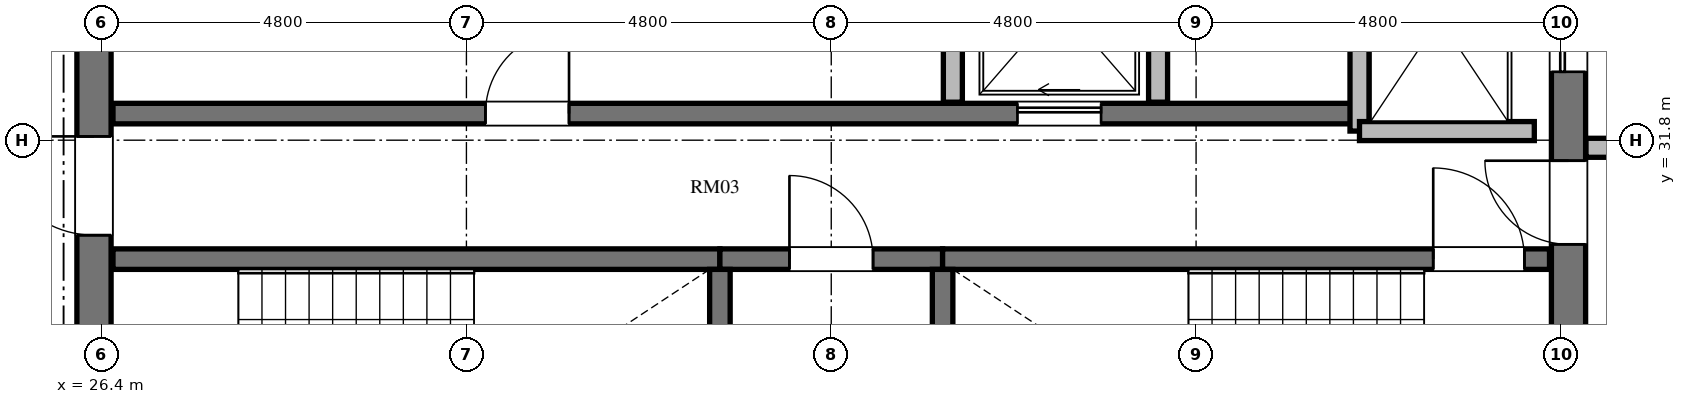
"""IFC4 building model, lengths in metres.
Left out: names, types, materials, properties, quantities, classifications, styles, units other than length and angle.
Written with IfcOpenShell. Run it as: python <this file> out.ifc"""

import sys

from ifc_helpers import new_model, si_unit, direction, frame, frame_2d, origin, place, context, subcontext, project, spatial, rectangle, extrude, element, fill, save


model = new_model("IFC4")
c1 = context("Model", 3, precision=1e-05, world=origin(), true_north=direction((0.0, 1.0)))
c2 = subcontext(c1, "Body", "Model", "MODEL_VIEW")
j1 = project(units=[si_unit("LENGTHUNIT", "METRE"), si_unit("PLANEANGLEUNIT", "RADIAN")], contexts=[c1])
p1 = place(None, origin())
s1 = spatial("IfcSite", under=j1, at=p1, CompositionType="ELEMENT")
p2 = place(p1, origin())
s2 = spatial("IfcBuilding", under=s1, at=p2, CompositionType="ELEMENT")
p3 = place(p2, frame((0.0, 0.0, 312.612)))
s3 = spatial("IfcBuildingStorey", under=s2, at=p3, CompositionType="ELEMENT", Elevation=312.612)
p4 = place(p3, frame((26.3, 20.95, 0.0), z_axis=(0.0, 0.0, 1.0), x_axis=(0.0, 1.0, 0.0)))
e1 = element("IfcWall", 1, at=p4, inside=s3, PredefinedType="SHEAR", context=c2, shape_type="SweptSolid", body=[
    extrude(rectangle(XDim=14.1, YDim=0.45, at=frame_2d((7.05, 0.0))), origin(), (0.0, 0.0, 1.0), 3.388),
])
p5 = place(p4, frame((6.5, 0.0, 0.0)))
e2 = element("IfcOpeningElement", 2, at=p5, cuts=e1, PredefinedType="OPENING", context=c2, shape_type="SweptSolid", body=[
    extrude(rectangle(XDim=1.2, YDim=2.15, at=frame_2d((0.6, 1.075))), frame((0.0, 0.235, 0.0), z_axis=(0.0, -1.0, 0.0), x_axis=(1.0, 0.0, 0.0)), (0.0, 0.0, 1.0), 0.47),
])
p6 = place(p4, frame((9.6, 0.0, 0.0)))
e3 = element("IfcOpeningElement", 3, at=p6, cuts=e1, PredefinedType="OPENING", context=c2, shape_type="SweptSolid", body=[
    extrude(rectangle(XDim=1.3, YDim=2.2, at=frame_2d((0.65, 1.1))), frame((0.0, 0.235, 0.0), z_axis=(0.0, -1.0, 0.0), x_axis=(1.0, 0.0, 0.0)), (0.0, 0.0, 1.0), 0.47),
])
p7 = place(p4, frame((3.26, 0.0, 0.0)))
e4 = element("IfcOpeningElement", 4, at=p7, cuts=e1, PredefinedType="OPENING", context=c2, shape_type="SweptSolid", body=[
    extrude(rectangle(XDim=1.3, YDim=2.2, at=frame_2d((0.65, 1.1))), frame((0.0, 0.235, 0.0), z_axis=(0.0, -1.0, 0.0), x_axis=(1.0, 0.0, 0.0)), (0.0, 0.0, 1.0), 0.47),
])
p8 = place(p3, frame((45.7, 20.95, 0.0), z_axis=(0.0, 0.0, 1.0), x_axis=(0.0, 1.0, 0.0)))
e5 = element("IfcWall", 5, at=p8, inside=s3, PredefinedType="SHEAR", context=c2, shape_type="SweptSolid", body=[
    extrude(rectangle(XDim=14.1, YDim=0.45, at=frame_2d((7.05, 0.0))), origin(), (0.0, 0.0, 1.0), 3.388),
])
p9 = place(p8, frame((11.75, 0.0, 0.0)))
e6 = element("IfcOpeningElement", 6, at=p9, cuts=e5, PredefinedType="OPENING", context=c2, shape_type="SweptSolid", body=[
    extrude(rectangle(XDim=1.4, YDim=2.3, at=frame_2d((0.7, 1.15))), frame((0.0, 0.235, 0.0), z_axis=(0.0, -1.0, 0.0), x_axis=(1.0, 0.0, 0.0)), (0.0, 0.0, 1.0), 0.47),
])
p10 = place(p8, frame((0.95, 0.0, 0.0)))
e7 = element("IfcOpeningElement", 7, at=p10, cuts=e5, PredefinedType="OPENING", context=c2, shape_type="SweptSolid", body=[
    extrude(rectangle(XDim=1.4, YDim=2.3, at=frame_2d((0.7, 1.15))), frame((0.0, 0.235, 0.0), z_axis=(0.0, -1.0, 0.0), x_axis=(1.0, 0.0, 0.0)), (0.0, 0.0, 1.0), 0.47),
])
p11 = place(p8, frame((9.48, 0.0, 0.0)))
e8 = element("IfcOpeningElement", 8, at=p11, cuts=e5, PredefinedType="OPENING", context=c2, shape_type="SweptSolid", body=[
    extrude(rectangle(XDim=1.1, YDim=2.15, at=frame_2d((0.55, 1.075))), frame((0.0, 0.235, 0.0), z_axis=(0.0, -1.0, 0.0), x_axis=(1.0, 0.0, 0.0)), (0.0, 0.0, 1.0), 0.47),
])
p12 = place(p3, frame((26.55, 30.235, 0.0), z_axis=(0.0, 0.0, 1.0), x_axis=(1.0, 0.0, 0.0)))
e9 = element("IfcWall", 9, at=p12, inside=s3, PredefinedType="SHEAR", context=c2, shape_type="SweptSolid", body=[
    extrude(rectangle(XDim=7.985, YDim=0.27, at=frame_2d((3.992, 0.0))), origin(), (0.0, 0.0, 1.0), 3.388),
])
p13 = place(p3, frame((34.535, 30.235, 0.0), z_axis=(0.0, 0.0, 1.0), x_axis=(1.0, 0.0, 0.0)))
e10 = element("IfcWall", 10, at=p13, inside=s3, PredefinedType="SHEAR", context=c2, shape_type="SweptSolid", body=[
    extrude(rectangle(XDim=2.93, YDim=0.27, at=frame_2d((1.465, 0.0))), origin(), (0.0, 0.0, 1.0), 3.388),
])
p14 = place(p13, frame((0.915, 0.0, 0.0)))
e11 = element("IfcOpeningElement", 11, at=p14, cuts=e10, PredefinedType="OPENING", context=c2, shape_type="SweptSolid", body=[
    extrude(rectangle(XDim=1.1, YDim=2.15, at=frame_2d((0.55, 1.075))), frame((0.0, 0.145, 0.0), z_axis=(0.0, -1.0, 0.0), x_axis=(1.0, 0.0, 0.0)), (0.0, 0.0, 1.0), 0.29),
])
p15 = place(p3, frame((37.465, 30.235, 0.0), z_axis=(0.0, 0.0, 1.0), x_axis=(1.0, 0.0, 0.0)))
e12 = element("IfcWall", 12, at=p15, inside=s3, PredefinedType="SHEAR", context=c2, shape_type="SweptSolid", body=[
    extrude(rectangle(XDim=7.985, YDim=0.27, at=frame_2d((3.992, 0.0))), origin(), (0.0, 0.0, 1.0), 3.388),
])
p16 = place(p15, frame((6.455, 0.0, 0.0)))
e13 = element("IfcOpeningElement", 13, at=p16, cuts=e12, PredefinedType="OPENING", context=c2, shape_type="SweptSolid", body=[
    extrude(rectangle(XDim=1.2, YDim=2.15, at=frame_2d((0.6, 1.075))), frame((0.0, 0.145, 0.0), z_axis=(0.0, -1.0, 0.0), x_axis=(1.0, 0.0, 0.0)), (0.0, 0.0, 1.0), 0.29),
])
for number, where, z_axis, x_axis in (
    (14, (34.535, 26.02, 0.0), (0.0, 0.0, 1.0), (0.0, 1.0, 0.0)),
    (15, (37.465, 26.02, 0.0), (0.0, 0.0, 1.0), (0.0, 1.0, 0.0)),
):
    element("IfcWall", number, at=place(p3, frame(where, z_axis=z_axis, x_axis=x_axis)), inside=s3, PredefinedType="SHEAR", context=c2, shape_type="SweptSolid", body=[
        extrude(rectangle(XDim=4.08, YDim=0.27, at=frame_2d((2.04, 0.0))), origin(), (0.0, 0.0, 1.0), 3.388),
    ])
p17 = place(p3, frame((26.55, 32.15, 0.0), z_axis=(0.0, 0.0, 1.0), x_axis=(1.0, 0.0, 0.0)))
e16 = element("IfcWall", 16, at=p17, inside=s3, PredefinedType="SHEAR", context=c2, shape_type="SweptSolid", body=[
    extrude(rectangle(XDim=16.4, YDim=0.27, at=frame_2d((8.2, 0.0))), origin(), (0.0, 0.0, 1.0), 3.388),
])
p18 = place(p17, frame((4.9, 0.0, 0.0)))
e17 = element("IfcOpeningElement", 17, at=p18, cuts=e16, PredefinedType="OPENING", context=c2, shape_type="SweptSolid", body=[
    extrude(rectangle(XDim=1.1, YDim=2.15, at=frame_2d((0.55, 1.075))), frame((0.0, 0.145, 0.0), z_axis=(0.0, -1.0, 0.0), x_axis=(1.0, 0.0, 0.0)), (0.0, 0.0, 1.0), 0.29),
])
p19 = place(p17, frame((11.9, 0.0, 0.0)))
e18 = element("IfcOpeningElement", 18, at=p19, cuts=e16, PredefinedType="OPENING", context=c2, shape_type="SweptSolid", body=[
    extrude(rectangle(XDim=1.1, YDim=2.2, at=frame_2d((0.55, 1.1))), frame((0.0, 0.145, 0.0), z_axis=(0.0, -1.0, 0.0), x_axis=(1.0, 0.0, 0.0)), (0.0, 0.0, 1.0), 0.29),
])
p20 = place(p3, frame((42.95, 31.92, 0.0), z_axis=(0.0, 0.0, 1.0), x_axis=(0.0, 1.0, 0.0)))
e19 = element("IfcWall", 19, at=p20, inside=s3, PredefinedType="SOLIDWALL", context=c2, shape_type="SweptSolid", body=[
    extrude(rectangle(XDim=3.18, YDim=0.25, at=frame_2d((1.59, 0.0))), origin(), (0.0, 0.0, 1.0), 3.008),
])
p21 = place(p3, frame((42.95, 31.92, 0.0), z_axis=(0.0, 0.0, 1.0), x_axis=(1.0, 0.0, 0.0)))
e20 = element("IfcWall", 20, at=p21, inside=s3, PredefinedType="SOLIDWALL", context=c2, shape_type="SweptSolid", body=[
    extrude(rectangle(XDim=2.3, YDim=0.25, at=frame_2d((1.15, 0.0))), origin(), (0.0, 0.0, 1.0), 3.008),
])
for number, where, z_axis, x_axis in (
    (21, (37.6, 32.3, 0.0), (0.0, 0.0, 1.0), (0.0, 1.0, 0.0)),
    (22, (40.3, 32.3, 0.0), (0.0, 0.0, 1.0), (0.0, 1.0, 0.0)),
):
    element("IfcWall", number, at=place(p3, frame(where, z_axis=z_axis, x_axis=x_axis)), inside=s3, PredefinedType="SOLIDWALL", context=c2, shape_type="SweptSolid", body=[
        extrude(rectangle(XDim=2.8, YDim=0.25, at=frame_2d((1.4, 0.0))), origin(), (0.0, 0.0, 1.0), 3.008),
    ])
p22 = place(p3, frame((45.93, 31.7, 0.0), z_axis=(0.0, 0.0, 1.0), x_axis=(1.0, 0.0, 0.0)))
e23 = element("IfcWall", 23, at=p22, inside=s3, PredefinedType="SOLIDWALL", context=c2, shape_type="SweptSolid", body=[
    extrude(rectangle(XDim=2.52, YDim=0.25, at=frame_2d((1.26, 0.0))), origin(), (0.0, 0.0, 1.0), 3.008),
])
p23 = place(p16, origin())
e24 = element("IfcDoor", 24, at=p23, inside=s3, OperationType="SINGLE_SWING_LEFT", PredefinedType="DOOR", context=c2, shape_type="SweptSolid", body=[
    extrude(rectangle(XDim=1.2, YDim=2.15, at=frame_2d((0.6, 1.075))), frame((0.0, 0.025, 0.0), z_axis=(0.0, -1.0, 0.0), x_axis=(1.0, 0.0, 0.0)), (0.0, 0.0, 1.0), 0.05),
])
fill(e13, e24)
p24 = place(p14, origin())
e25 = element("IfcDoor", 25, at=p24, inside=s3, OperationType="SINGLE_SWING_LEFT", PredefinedType="DOOR", context=c2, shape_type="SweptSolid", body=[
    extrude(rectangle(XDim=1.1, YDim=2.15, at=frame_2d((0.55, 1.075))), frame((0.0, 0.025, 0.0), z_axis=(0.0, -1.0, 0.0), x_axis=(1.0, 0.0, 0.0)), (0.0, 0.0, 1.0), 0.05),
])
fill(e11, e25)
p25 = place(p6, origin())
e26 = element("IfcDoor", 26, at=p25, inside=s3, OperationType="SINGLE_SWING_RIGHT", PredefinedType="DOOR", context=c2, shape_type="SweptSolid", body=[
    extrude(rectangle(XDim=1.3, YDim=2.2, at=frame_2d((0.65, 1.1))), frame((0.0, 0.025, 0.0), z_axis=(0.0, -1.0, 0.0), x_axis=(1.0, 0.0, 0.0)), (0.0, 0.0, 1.0), 0.05),
])
fill(e3, e26)
p26 = place(p18, origin())
e27 = element("IfcDoor", 27, at=p26, inside=s3, OperationType="SINGLE_SWING_RIGHT", PredefinedType="DOOR", context=c2, shape_type="SweptSolid", body=[
    extrude(rectangle(XDim=1.1, YDim=2.15, at=frame_2d((0.55, 1.075))), frame((0.0, 0.025, 0.0), z_axis=(0.0, -1.0, 0.0), x_axis=(1.0, 0.0, 0.0)), (0.0, 0.0, 1.0), 0.05),
])
fill(e17, e27)
p27 = place(p19, origin())
e28 = element("IfcDoor", 28, at=p27, inside=s3, OperationType="SLIDING_TO_LEFT", PredefinedType="DOOR", context=c2, shape_type="SweptSolid", body=[
    extrude(rectangle(XDim=1.1, YDim=2.2, at=frame_2d((0.55, 1.1))), frame((0.0, 0.025, 0.0), z_axis=(0.0, -1.0, 0.0), x_axis=(1.0, 0.0, 0.0)), (0.0, 0.0, 1.0), 0.05),
])
fill(e18, e28)
p28 = place(p9, origin())
e29 = element("IfcDoor", 29, at=p28, inside=s3, OperationType="SLIDING_TO_LEFT", PredefinedType="DOOR", context=c2, shape_type="SweptSolid", body=[
    extrude(rectangle(XDim=1.4, YDim=2.3, at=frame_2d((0.7, 1.15))), frame((0.0, 0.025, 0.0), z_axis=(0.0, -1.0, 0.0), x_axis=(1.0, 0.0, 0.0)), (0.0, 0.0, 1.0), 0.05),
])
fill(e6, e29)
p29 = place(p11, origin())
e30 = element("IfcDoor", 30, at=p29, inside=s3, OperationType="SINGLE_SWING_RIGHT", PredefinedType="DOOR", context=c2, shape_type="SweptSolid", body=[
    extrude(rectangle(XDim=1.1, YDim=2.15, at=frame_2d((0.55, 1.075))), frame((0.0, 0.025, 0.0), z_axis=(0.0, -1.0, 0.0), x_axis=(1.0, 0.0, 0.0)), (0.0, 0.0, 1.0), 0.05),
])
fill(e8, e30)
save(model, sys.argv[1])
